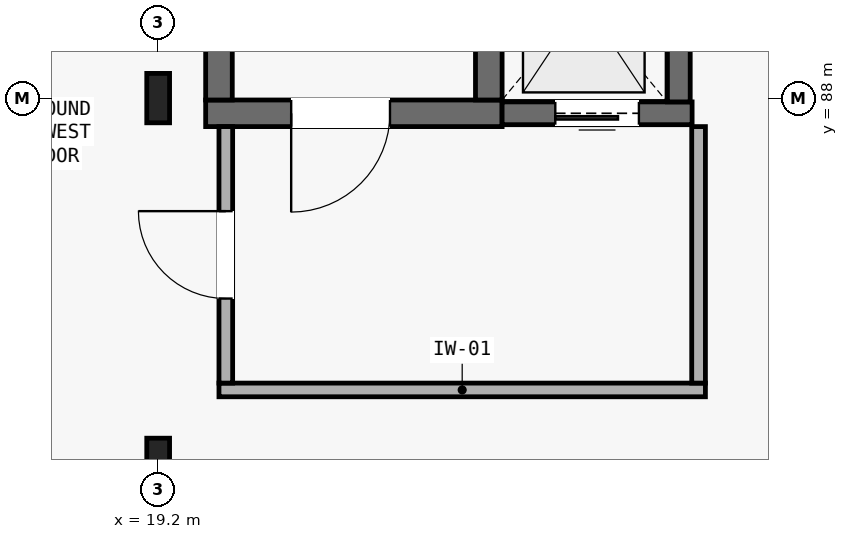
"""IFC4 building model, lengths in metres.
Left out: names, types, materials, properties, quantities, classifications, styles, units other than length and angle.
Written with IfcOpenShell. Run it as: python <this file> out.ifc"""

import sys

from ifc_helpers import new_model, si_unit, direction, frame, frame_2d, origin, origin_2d, place, context, subcontext, project, spatial, rectangle, i_section, extrude, element, fill, save


model = new_model("IFC4")
c1 = context("Model", 3, precision=1e-05, world=origin(), true_north=direction((0.0, 1.0)))
c2 = subcontext(c1, "Body", "Model", "MODEL_VIEW")
j1 = project(units=[si_unit("LENGTHUNIT", "METRE"), si_unit("PLANEANGLEUNIT", "RADIAN")], contexts=[c1])
p1 = place(None, origin())
s1 = spatial("IfcSite", under=j1, at=p1, CompositionType="ELEMENT")
p2 = place(p1, origin())
s2 = spatial("IfcBuilding", under=s1, at=p2, CompositionType="ELEMENT")
p3 = place(p2, frame((0.0, 0.0, -4.55)))
s3 = spatial("IfcBuildingStorey", under=s2, at=p3, CompositionType="ELEMENT", Elevation=-4.55)
for number, where, z_axis, x_axis in (
    (1, (19.2, 83.2, 0.0), (0.0, 0.0, 1.0), (1.0, 0.0, 0.0)),
    (2, (19.2, 88.0, 0.0), (0.0, 0.0, 1.0), (1.0, 0.0, 0.0)),
):
    element("IfcColumn", number, at=place(p3, frame(where, z_axis=z_axis, x_axis=x_axis)), inside=s3, PredefinedType="COLUMN", context=c2, shape_type="SweptSolid", body=[
        extrude(i_section(OverallWidth=0.3, OverallDepth=0.65, WebThickness=0.016, FlangeThickness=0.031, FilletRadius=0.027, at=origin_2d()), origin(), (0.0, 0.0, 1.0), 4.55),
    ])
p4 = place(p3, frame((19.825, 87.8, 0.0), z_axis=(0.0, 0.0, 1.0), x_axis=(1.0, 0.0, 0.0)))
e3 = element("IfcWall", 3, at=p4, inside=s3, PredefinedType="SHEAR", context=c2, shape_type="SweptSolid", body=[
    extrude(rectangle(XDim=3.9, YDim=0.35, at=frame_2d((1.95, 0.0))), origin(), (0.0, 0.0, 1.0), 4.28),
])
p5 = place(p4, frame((1.125, 0.0, 0.0)))
e4 = element("IfcOpeningElement", 4, at=p5, cuts=e3, PredefinedType="OPENING", context=c2, shape_type="SweptSolid", body=[
    extrude(rectangle(XDim=1.3, YDim=2.15, at=frame_2d((0.65, 1.075))), frame((0.0, 0.185, 0.0), z_axis=(0.0, -1.0, 0.0), x_axis=(1.0, 0.0, 0.0)), (0.0, 0.0, 1.0), 0.37),
])
for number, where, z_axis, x_axis in (
    (5, (20.0, 87.975, 0.0), (0.0, 0.0, 1.0), (0.0, 1.0, 0.0)),
    (6, (23.55, 87.975, 0.0), (0.0, 0.0, 1.0), (0.0, 1.0, 0.0)),
):
    element("IfcWall", number, at=place(p3, frame(where, z_axis=z_axis, x_axis=x_axis)), inside=s3, PredefinedType="SHEAR", context=c2, shape_type="SweptSolid", body=[
        extrude(rectangle(XDim=7.6, YDim=0.35, at=frame_2d((3.8, 0.0))), origin(), (0.0, 0.0, 1.0), 4.28),
    ])
p6 = place(p3, frame((23.725, 87.8, 0.0), z_axis=(0.0, 0.0, 1.0), x_axis=(1.0, 0.0, 0.0)))
e7 = element("IfcWall", 7, at=p6, inside=s3, PredefinedType="SHEAR", context=c2, shape_type="SweptSolid", body=[
    extrude(rectangle(XDim=2.5, YDim=0.3, at=frame_2d((1.25, 0.0))), origin(), (0.0, 0.0, 1.0), 4.28),
])
p7 = place(p6, frame((0.7, 0.0, 0.0)))
e8 = element("IfcOpeningElement", 8, at=p7, cuts=e7, PredefinedType="OPENING", context=c2, shape_type="SweptSolid", body=[
    extrude(rectangle(XDim=1.1, YDim=2.1, at=frame_2d((0.55, 1.05))), frame((0.0, 0.16, 0.0), z_axis=(0.0, -1.0, 0.0), x_axis=(1.0, 0.0, 0.0)), (0.0, 0.0, 1.0), 0.32),
])
p8 = place(p3, frame((26.05, 87.95, 0.0), z_axis=(0.0, 0.0, 1.0), x_axis=(0.0, 1.0, 0.0)))
e9 = element("IfcWall", 9, at=p8, inside=s3, PredefinedType="SHEAR", context=c2, shape_type="SweptSolid", body=[
    extrude(rectangle(XDim=2.65, YDim=0.3, at=frame_2d((1.325, 0.0))), origin(), (0.0, 0.0, 1.0), 4.28),
])
p9 = place(p3, frame((20.0, 84.16, 0.0), z_axis=(0.0, 0.0, 1.0), x_axis=(1.0, 0.0, 0.0)))
e10 = element("IfcWall", 10, at=p9, inside=s3, PredefinedType="PARTITIONING", context=c2, shape_type="SweptSolid", body=[
    extrude(rectangle(XDim=6.4, YDim=0.18, at=frame_2d((3.2, 0.0))), origin(), (0.0, 0.0, 1.0), 4.28),
])
p10 = place(p3, frame((20.09, 84.25, 0.0), z_axis=(0.0, 0.0, 1.0), x_axis=(0.0, 1.0, 0.0)))
e11 = element("IfcWall", 11, at=p10, inside=s3, PredefinedType="PARTITIONING", context=c2, shape_type="SweptSolid", body=[
    extrude(rectangle(XDim=3.375, YDim=0.18, at=frame_2d((1.688, 0.0))), origin(), (0.0, 0.0, 1.0), 4.28),
])
p11 = place(p10, frame((1.113, 0.0, 0.0)))
e12 = element("IfcOpeningElement", 12, at=p11, cuts=e11, PredefinedType="OPENING", context=c2, shape_type="SweptSolid", body=[
    extrude(rectangle(XDim=1.15, YDim=2.15, at=frame_2d((0.575, 1.075))), frame((0.0, 0.1, 0.0), z_axis=(0.0, -1.0, 0.0), x_axis=(1.0, 0.0, 0.0)), (0.0, 0.0, 1.0), 0.2),
])
p12 = place(p3, frame((26.31, 84.25, 0.0), z_axis=(0.0, 0.0, 1.0), x_axis=(0.0, 1.0, 0.0)))
e13 = element("IfcWall", 13, at=p12, inside=s3, PredefinedType="PARTITIONING", context=c2, shape_type="SweptSolid", body=[
    extrude(rectangle(XDim=3.375, YDim=0.18, at=frame_2d((1.688, 0.0))), origin(), (0.0, 0.0, 1.0), 4.28),
])
p13 = place(p5, frame((1.3, 0.0, 0.0), z_axis=(0.0, 0.0, 1.0), x_axis=(-1.0, 0.0, 0.0)))
e14 = element("IfcDoor", 14, at=p13, inside=s3, OperationType="SINGLE_SWING_LEFT", PredefinedType="DOOR", context=c2, shape_type="SweptSolid", body=[
    extrude(rectangle(XDim=1.3, YDim=2.15, at=frame_2d((0.65, 1.075))), frame((0.0, 0.025, 0.0), z_axis=(0.0, -1.0, 0.0), x_axis=(1.0, 0.0, 0.0)), (0.0, 0.0, 1.0), 0.05),
])
fill(e4, e14)
p14 = place(p7, frame((1.1, 0.0, 0.0), z_axis=(0.0, 0.0, 1.0), x_axis=(-1.0, 0.0, 0.0)))
e15 = element("IfcDoor", 15, at=p14, inside=s3, OperationType="SLIDING_TO_LEFT", PredefinedType="DOOR", context=c2, shape_type="SweptSolid", body=[
    extrude(rectangle(XDim=1.1, YDim=2.1, at=frame_2d((0.55, 1.05))), frame((0.0, 0.025, 0.0), z_axis=(0.0, -1.0, 0.0), x_axis=(1.0, 0.0, 0.0)), (0.0, 0.0, 1.0), 0.05),
])
fill(e8, e15)
p15 = place(p11, origin())
e16 = element("IfcDoor", 16, at=p15, inside=s3, OperationType="SINGLE_SWING_RIGHT", PredefinedType="DOOR", context=c2, shape_type="SweptSolid", body=[
    extrude(rectangle(XDim=1.15, YDim=2.15, at=frame_2d((0.575, 1.075))), frame((0.0, 0.025, 0.0), z_axis=(0.0, -1.0, 0.0), x_axis=(1.0, 0.0, 0.0)), (0.0, 0.0, 1.0), 0.05),
])
fill(e12, e16)
save(model, sys.argv[1])
